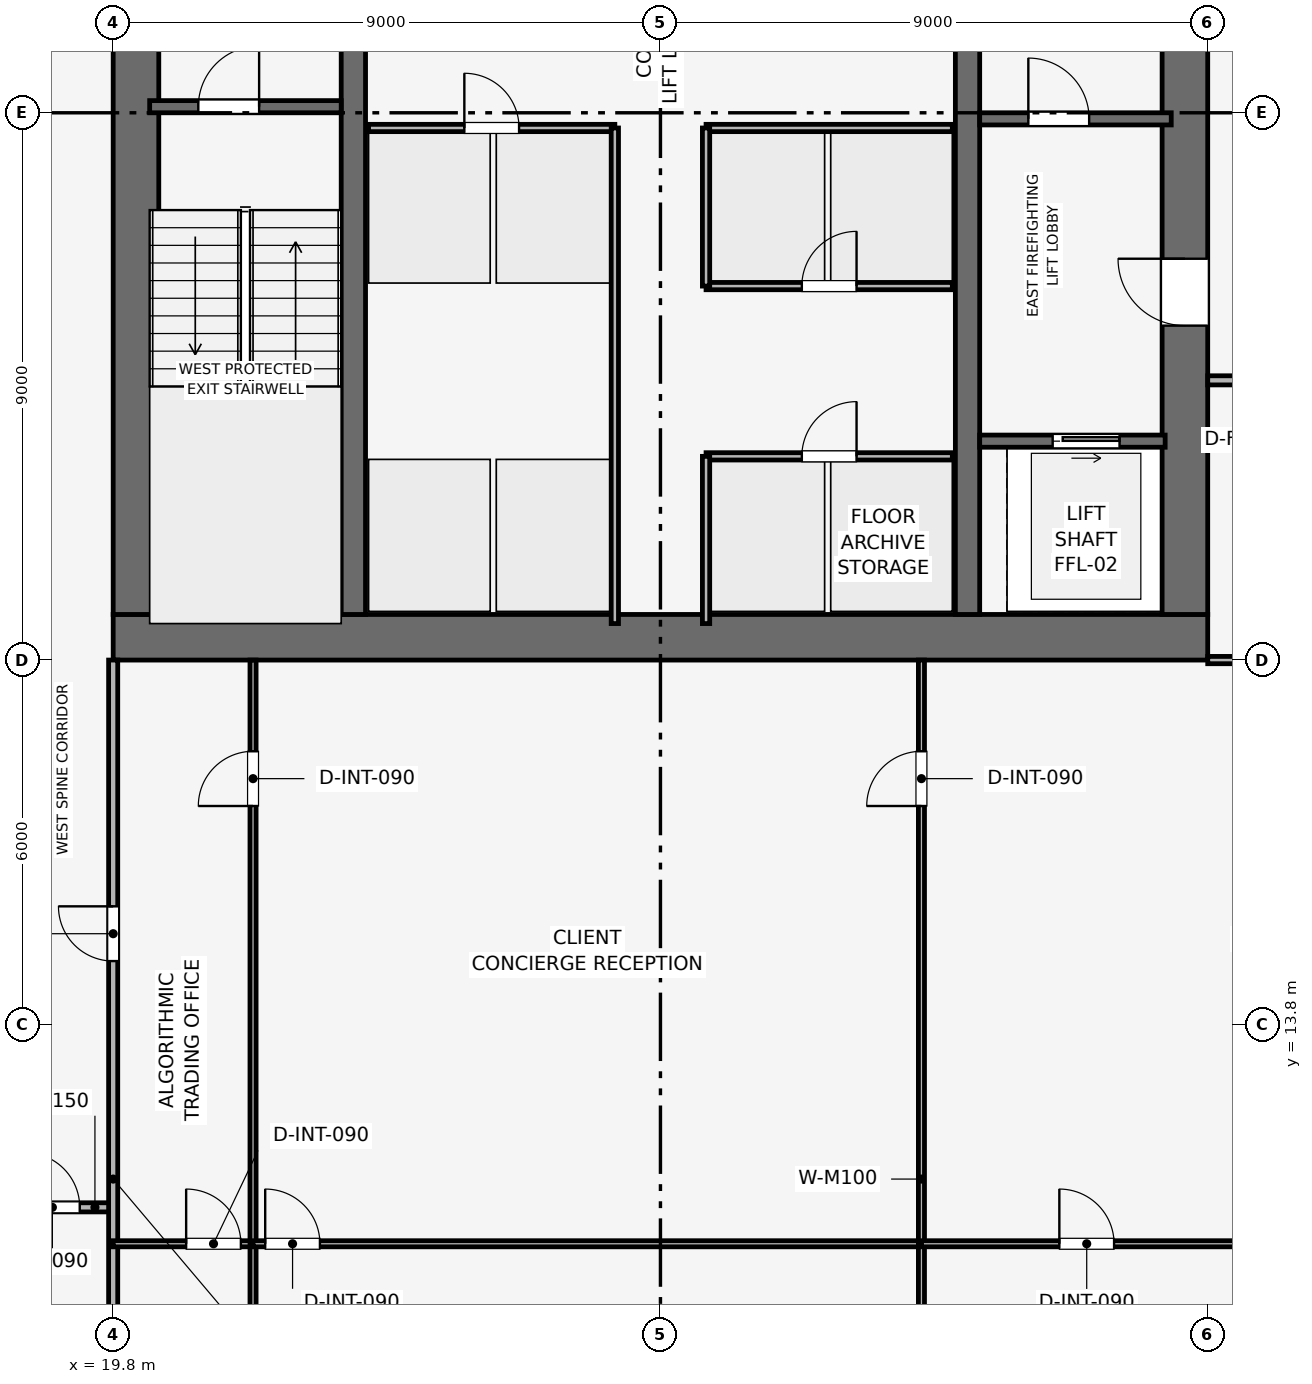
"""IFC4 building model, lengths in metres.
Left out: names, types, materials, properties, quantities, classifications, styles, units other than length and angle.
Written with IfcOpenShell. Run it as: python <this file> out.ifc"""

import sys

from ifc_helpers import new_model, si_unit, direction, frame, frame_2d, origin, place, context, subcontext, project, spatial, rectangle, extrude, element, fill, save


model = new_model("IFC4")
c1 = context("Model", 3, precision=1e-05, world=origin(), true_north=direction((0.0, 1.0)))
c2 = subcontext(c1, "Body", "Model", "MODEL_VIEW")
j1 = project(units=[si_unit("LENGTHUNIT", "METRE"), si_unit("PLANEANGLEUNIT", "RADIAN")], contexts=[c1])
p1 = place(None, origin())
s1 = spatial("IfcSite", under=j1, at=p1, CompositionType="ELEMENT")
p2 = place(p1, origin())
s2 = spatial("IfcBuilding", under=s1, at=p2, CompositionType="ELEMENT")
p3 = place(p2, frame((0.0, 0.0, 265.35)))
s3 = spatial("IfcBuildingStorey", under=s2, at=p3, CompositionType="ELEMENT", Elevation=265.35)
p4 = place(p3, frame((19.8, 20.175, 0.0), z_axis=(0.0, 0.0, 1.0), x_axis=(1.0, 0.0, 0.0)))
e1 = element("IfcWall", 1, at=p4, inside=s3, PredefinedType="SHEAR", context=c2, shape_type="SweptSolid", body=[
    extrude(rectangle(XDim=18.0, YDim=0.75, at=frame_2d((9.0, 0.0))), origin(), (0.0, 0.0, 1.0), 3.75),
])
p5 = place(p3, frame((20.175, 20.55, 0.0), z_axis=(0.0, 0.0, 1.0), x_axis=(0.0, 1.0, 0.0)))
e2 = element("IfcWall", 2, at=p5, inside=s3, PredefinedType="SHEAR", context=c2, shape_type="SweptSolid", body=[
    extrude(rectangle(XDim=16.5, YDim=0.75, at=frame_2d((8.25, 0.0))), origin(), (0.0, 0.0, 1.0), 3.75),
])
p6 = place(p5, frame((10.25, 0.0, 0.0)))
e3 = element("IfcOpeningElement", 3, at=p6, cuts=e2, PredefinedType="OPENING", context=c2, shape_type="SweptSolid", body=[
    extrude(rectangle(XDim=1.1, YDim=2.15, at=frame_2d((0.55, 1.075))), frame((0.0, 0.385, 0.0), z_axis=(0.0, -1.0, 0.0), x_axis=(1.0, 0.0, 0.0)), (0.0, 0.0, 1.0), 0.77),
])
p7 = place(p3, frame((37.425, 20.55, 0.0), z_axis=(0.0, 0.0, 1.0), x_axis=(0.0, 1.0, 0.0)))
e4 = element("IfcWall", 4, at=p7, inside=s3, PredefinedType="SHEAR", context=c2, shape_type="SweptSolid", body=[
    extrude(rectangle(XDim=16.5, YDim=0.75, at=frame_2d((8.25, 0.0))), origin(), (0.0, 0.0, 1.0), 3.75),
])
p8 = place(p7, frame((4.75, 0.0, 0.0)))
e5 = element("IfcOpeningElement", 5, at=p8, cuts=e4, PredefinedType="OPENING", context=c2, shape_type="SweptSolid", body=[
    extrude(rectangle(XDim=1.1, YDim=2.15, at=frame_2d((0.55, 1.075))), frame((0.0, 0.385, 0.0), z_axis=(0.0, -1.0, 0.0), x_axis=(1.0, 0.0, 0.0)), (0.0, 0.0, 1.0), 0.77),
])
for number, where, z_axis, x_axis in (
    (6, (23.75, 20.55, 0.0), (0.0, 0.0, 1.0), (0.0, 1.0, 0.0)),
    (7, (33.85, 20.55, 0.0), (0.0, 0.0, 1.0), (0.0, 1.0, 0.0)),
):
    element("IfcWall", number, at=place(p3, frame(where, z_axis=z_axis, x_axis=x_axis)), inside=s3, PredefinedType="SHEAR", context=c2, shape_type="SweptSolid", body=[
        extrude(rectangle(XDim=16.5, YDim=0.4, at=frame_2d((8.25, 0.0))), origin(), (0.0, 0.0, 1.0), 3.75),
    ])
p9 = place(p3, frame((20.4, 28.9, 0.0), z_axis=(0.0, 0.0, 1.0), x_axis=(1.0, 0.0, 0.0)))
e8 = element("IfcWall", 8, at=p9, inside=s3, PredefinedType="SHEAR", context=c2, shape_type="SweptSolid", body=[
    extrude(rectangle(XDim=3.15, YDim=0.2, at=frame_2d((1.575, 0.0))), origin(), (0.0, 0.0, 1.0), 3.5),
])
p10 = place(p9, frame((0.8, 0.0, 0.0)))
e9 = element("IfcOpeningElement", 9, at=p10, cuts=e8, PredefinedType="OPENING", context=c2, shape_type="SweptSolid", body=[
    extrude(rectangle(XDim=1.0, YDim=2.1, at=frame_2d((0.5, 1.05))), frame((0.0, 0.11, 0.0), z_axis=(0.0, -1.0, 0.0), x_axis=(1.0, 0.0, 0.0)), (0.0, 0.0, 1.0), 0.22),
])
p11 = place(p3, frame((34.05, 28.7, 0.0), z_axis=(0.0, 0.0, 1.0), x_axis=(1.0, 0.0, 0.0)))
e10 = element("IfcWall", 10, at=p11, inside=s3, PredefinedType="SHEAR", context=c2, shape_type="SweptSolid", body=[
    extrude(rectangle(XDim=3.15, YDim=0.2, at=frame_2d((1.575, 0.0))), origin(), (0.0, 0.0, 1.0), 3.5),
])
p12 = place(p11, frame((0.8, 0.0, 0.0)))
e11 = element("IfcOpeningElement", 11, at=p12, cuts=e10, PredefinedType="OPENING", context=c2, shape_type="SweptSolid", body=[
    extrude(rectangle(XDim=1.0, YDim=2.1, at=frame_2d((0.5, 1.05))), frame((0.0, 0.11, 0.0), z_axis=(0.0, -1.0, 0.0), x_axis=(1.0, 0.0, 0.0)), (0.0, 0.0, 1.0), 0.22),
])
p13 = place(p3, frame((34.05, 23.4, 0.0), z_axis=(0.0, 0.0, 1.0), x_axis=(1.0, 0.0, 0.0)))
e12 = element("IfcWall", 12, at=p13, inside=s3, PredefinedType="SHEAR", context=c2, shape_type="SweptSolid", body=[
    extrude(rectangle(XDim=3.05, YDim=0.2, at=frame_2d((1.525, 0.0))), origin(), (0.0, 0.0, 1.0), 3.5),
])
p14 = place(p13, frame((1.2, 0.0, 0.0)))
e13 = element("IfcOpeningElement", 13, at=p14, cuts=e12, PredefinedType="OPENING", context=c2, shape_type="SweptSolid", body=[
    extrude(rectangle(XDim=1.1, YDim=2.15, at=frame_2d((0.55, 1.075))), frame((0.0, 0.11, 0.0), z_axis=(0.0, -1.0, 0.0), x_axis=(1.0, 0.0, 0.0)), (0.0, 0.0, 1.0), 0.22),
])
p15 = place(p3, frame((24.0, 28.55, 0.0), z_axis=(0.0, 0.0, 1.0), x_axis=(1.0, 0.0, 0.0)))
e14 = element("IfcWall", 14, at=p15, inside=s3, PredefinedType="PARTITIONING", context=c2, shape_type="SweptSolid", body=[
    extrude(rectangle(XDim=4.05, YDim=0.12, at=frame_2d((2.025, 0.0))), origin(), (0.0, 0.0, 1.0), 3.5),
])
p16 = place(p15, frame((1.575, 0.0, 0.0)))
e15 = element("IfcOpeningElement", 15, at=p16, cuts=e14, PredefinedType="OPENING", context=c2, shape_type="SweptSolid", body=[
    extrude(rectangle(XDim=0.9, YDim=2.1, at=frame_2d((0.45, 1.05))), frame((0.0, 0.07, 0.0), z_axis=(0.0, -1.0, 0.0), x_axis=(1.0, 0.0, 0.0)), (0.0, 0.0, 1.0), 0.14),
])
p17 = place(p3, frame((28.05, 20.4, 0.0), z_axis=(0.0, 0.0, 1.0), x_axis=(0.0, 1.0, 0.0)))
e16 = element("IfcWall", 16, at=p17, inside=s3, PredefinedType="PARTITIONING", context=c2, shape_type="SweptSolid", body=[
    extrude(rectangle(XDim=8.15, YDim=0.12, at=frame_2d((4.075, 0.0))), origin(), (0.0, 0.0, 1.0), 3.5),
])
p18 = place(p3, frame((29.55, 23.15, 0.0), z_axis=(0.0, 0.0, 1.0), x_axis=(1.0, 0.0, 0.0)))
e17 = element("IfcWall", 17, at=p18, inside=s3, PredefinedType="PARTITIONING", context=c2, shape_type="SweptSolid", body=[
    extrude(rectangle(XDim=4.05, YDim=0.12, at=frame_2d((2.025, 0.0))), origin(), (0.0, 0.0, 1.0), 3.5),
])
p19 = place(p18, frame((1.575, 0.0, 0.0)))
e18 = element("IfcOpeningElement", 18, at=p19, cuts=e17, PredefinedType="OPENING", context=c2, shape_type="SweptSolid", body=[
    extrude(rectangle(XDim=0.9, YDim=2.1, at=frame_2d((0.45, 1.05))), frame((0.0, 0.07, 0.0), z_axis=(0.0, -1.0, 0.0), x_axis=(1.0, 0.0, 0.0)), (0.0, 0.0, 1.0), 0.14),
])
p20 = place(p3, frame((29.55, 20.4, 0.0), z_axis=(0.0, 0.0, 1.0), x_axis=(0.0, 1.0, 0.0)))
e19 = element("IfcWall", 19, at=p20, inside=s3, PredefinedType="PARTITIONING", context=c2, shape_type="SweptSolid", body=[
    extrude(rectangle(XDim=2.75, YDim=0.12, at=frame_2d((1.375, 0.0))), origin(), (0.0, 0.0, 1.0), 3.5),
])
p21 = place(p3, frame((29.55, 25.95, 0.0), z_axis=(0.0, 0.0, 1.0), x_axis=(1.0, 0.0, 0.0)))
e20 = element("IfcWall", 20, at=p21, inside=s3, PredefinedType="PARTITIONING", context=c2, shape_type="SweptSolid", body=[
    extrude(rectangle(XDim=4.05, YDim=0.12, at=frame_2d((2.025, 0.0))), origin(), (0.0, 0.0, 1.0), 3.5),
])
p22 = place(p21, frame((1.575, 0.0, 0.0)))
e21 = element("IfcOpeningElement", 21, at=p22, cuts=e20, PredefinedType="OPENING", context=c2, shape_type="SweptSolid", body=[
    extrude(rectangle(XDim=0.9, YDim=2.1, at=frame_2d((0.45, 1.05))), frame((0.0, 0.07, 0.0), z_axis=(0.0, -1.0, 0.0), x_axis=(1.0, 0.0, 0.0)), (0.0, 0.0, 1.0), 0.14),
])
p23 = place(p3, frame((29.55, 28.55, 0.0), z_axis=(0.0, 0.0, 1.0), x_axis=(1.0, 0.0, 0.0)))
e22 = element("IfcWall", 22, at=p23, inside=s3, PredefinedType="PARTITIONING", context=c2, shape_type="SweptSolid", body=[
    extrude(rectangle(XDim=4.05, YDim=0.12, at=frame_2d((2.025, 0.0))), origin(), (0.0, 0.0, 1.0), 3.5),
])
p24 = place(p3, frame((29.55, 25.95, 0.0), z_axis=(0.0, 0.0, 1.0), x_axis=(0.0, 1.0, 0.0)))
e23 = element("IfcWall", 23, at=p24, inside=s3, PredefinedType="PARTITIONING", context=c2, shape_type="SweptSolid", body=[
    extrude(rectangle(XDim=2.6, YDim=0.12, at=frame_2d((1.3, 0.0))), origin(), (0.0, 0.0, 1.0), 3.5),
])
p25 = place(p3, frame((17.9, 10.8, 0.0), z_axis=(0.0, 0.0, 1.0), x_axis=(1.0, 0.0, 0.0)))
e24 = element("IfcWall", 24, at=p25, inside=s3, PredefinedType="PARTITIONING", context=c2, shape_type="SweptSolid", body=[
    extrude(rectangle(XDim=1.9, YDim=0.15, at=frame_2d((0.95, 0.0))), origin(), (0.0, 0.0, 1.0), 3.5),
])
p26 = place(p25, frame((0.45, 0.0, 0.0)))
e25 = element("IfcOpeningElement", 25, at=p26, cuts=e24, PredefinedType="OPENING", context=c2, shape_type="SweptSolid", body=[
    extrude(rectangle(XDim=0.9, YDim=2.1, at=frame_2d((0.45, 1.05))), frame((0.0, 0.085, 0.0), z_axis=(0.0, -1.0, 0.0), x_axis=(1.0, 0.0, 0.0)), (0.0, 0.0, 1.0), 0.17),
])
p27 = place(p3, frame((19.8, 4.03, 0.0), z_axis=(0.0, 0.0, 1.0), x_axis=(0.0, 1.0, 0.0)))
e26 = element("IfcWall", 26, at=p27, inside=s3, PredefinedType="PARTITIONING", context=c2, shape_type="SweptSolid", body=[
    extrude(rectangle(XDim=15.77, YDim=0.15, at=frame_2d((7.885, 0.0))), origin(), (0.0, 0.0, 1.0), 3.085),
])
p28 = place(p27, frame((10.82, 0.0, 0.0)))
e27 = element("IfcOpeningElement", 27, at=p28, cuts=e26, PredefinedType="OPENING", context=c2, shape_type="SweptSolid", body=[
    extrude(rectangle(XDim=0.9, YDim=2.1, at=frame_2d((0.45, 1.05))), frame((0.0, 0.085, 0.0), z_axis=(0.0, -1.0, 0.0), x_axis=(1.0, 0.0, 0.0)), (0.0, 0.0, 1.0), 0.17),
])
p29 = place(p3, frame((19.8, 10.201, 0.0), z_axis=(0.0, 0.0, 1.0), x_axis=(1.0, 0.0, 0.0)))
e28 = element("IfcWall", 28, at=p29, inside=s3, PredefinedType="MOVABLE", context=c2, shape_type="SweptSolid", body=[
    extrude(rectangle(XDim=2.3, YDim=0.1, at=frame_2d((1.15, 0.0))), origin(), (0.0, 0.0, 1.0), 3.085),
])
p30 = place(p29, frame((1.2, 0.0, 0.0)))
e29 = element("IfcOpeningElement", 29, at=p30, cuts=e28, PredefinedType="OPENING", context=c2, shape_type="SweptSolid", body=[
    extrude(rectangle(XDim=0.9, YDim=2.1, at=frame_2d((0.45, 1.05))), frame((0.0, 0.06, 0.0), z_axis=(0.0, -1.0, 0.0), x_axis=(1.0, 0.0, 0.0)), (0.0, 0.0, 1.0), 0.12),
])
p31 = place(p3, frame((22.1, 4.03, 0.0), z_axis=(0.0, 0.0, 1.0), x_axis=(0.0, 1.0, 0.0)))
e30 = element("IfcWall", 30, at=p31, inside=s3, PredefinedType="MOVABLE", context=c2, shape_type="SweptSolid", body=[
    extrude(rectangle(XDim=15.77, YDim=0.1, at=frame_2d((7.885, 0.0))), origin(), (0.0, 0.0, 1.0), 3.085),
])
p32 = place(p31, frame((13.37, 0.0, 0.0)))
e31 = element("IfcOpeningElement", 31, at=p32, cuts=e30, PredefinedType="OPENING", context=c2, shape_type="SweptSolid", body=[
    extrude(rectangle(XDim=0.9, YDim=2.1, at=frame_2d((0.45, 1.05))), frame((0.0, 0.06, 0.0), z_axis=(0.0, -1.0, 0.0), x_axis=(1.0, 0.0, 0.0)), (0.0, 0.0, 1.0), 0.12),
])
p33 = place(p3, frame((22.1, 10.201, 0.0), z_axis=(0.0, 0.0, 1.0), x_axis=(1.0, 0.0, 0.0)))
e32 = element("IfcWall", 32, at=p33, inside=s3, PredefinedType="MOVABLE", context=c2, shape_type="SweptSolid", body=[
    extrude(rectangle(XDim=10.992, YDim=0.1, at=frame_2d((5.496, 0.0))), origin(), (0.0, 0.0, 1.0), 3.085),
])
p34 = place(p33, frame((0.2, 0.0, 0.0)))
e33 = element("IfcOpeningElement", 33, at=p34, cuts=e32, PredefinedType="OPENING", context=c2, shape_type="SweptSolid", body=[
    extrude(rectangle(XDim=0.9, YDim=2.1, at=frame_2d((0.45, 1.05))), frame((0.0, 0.06, 0.0), z_axis=(0.0, -1.0, 0.0), x_axis=(1.0, 0.0, 0.0)), (0.0, 0.0, 1.0), 0.12),
])
p35 = place(p3, frame((33.092, 4.03, 0.0), z_axis=(0.0, 0.0, 1.0), x_axis=(0.0, 1.0, 0.0)))
e34 = element("IfcWall", 34, at=p35, inside=s3, PredefinedType="MOVABLE", context=c2, shape_type="SweptSolid", body=[
    extrude(rectangle(XDim=15.77, YDim=0.1, at=frame_2d((7.885, 0.0))), origin(), (0.0, 0.0, 1.0), 3.085),
])
p36 = place(p35, frame((13.37, 0.0, 0.0)))
e35 = element("IfcOpeningElement", 35, at=p36, cuts=e34, PredefinedType="OPENING", context=c2, shape_type="SweptSolid", body=[
    extrude(rectangle(XDim=0.9, YDim=2.1, at=frame_2d((0.45, 1.05))), frame((0.0, 0.06, 0.0), z_axis=(0.0, -1.0, 0.0), x_axis=(1.0, 0.0, 0.0)), (0.0, 0.0, 1.0), 0.12),
])
p37 = place(p3, frame((33.092, 10.201, 0.0), z_axis=(0.0, 0.0, 1.0), x_axis=(1.0, 0.0, 0.0)))
e36 = element("IfcWall", 36, at=p37, inside=s3, PredefinedType="MOVABLE", context=c2, shape_type="SweptSolid", body=[
    extrude(rectangle(XDim=13.708, YDim=0.1, at=frame_2d((6.854, 0.0))), origin(), (0.0, 0.0, 1.0), 3.085),
])
p38 = place(p37, frame((2.268, 0.0, 0.0)))
e37 = element("IfcOpeningElement", 37, at=p38, cuts=e36, PredefinedType="OPENING", context=c2, shape_type="SweptSolid", body=[
    extrude(rectangle(XDim=0.9, YDim=2.1, at=frame_2d((0.45, 1.05))), frame((0.0, 0.06, 0.0), z_axis=(0.0, -1.0, 0.0), x_axis=(1.0, 0.0, 0.0)), (0.0, 0.0, 1.0), 0.12),
])
p39 = place(p3, frame((37.8, 19.8, 0.0), z_axis=(0.0, 0.0, 1.0), x_axis=(1.0, 0.0, 0.0)))
e38 = element("IfcWall", 38, at=p39, inside=s3, PredefinedType="PARTITIONING", context=c2, shape_type="SweptSolid", body=[
    extrude(rectangle(XDim=15.77, YDim=0.12, at=frame_2d((7.885, 0.0))), origin(), (0.0, 0.0, 1.0), 3.085),
])
p40 = place(p3, frame((37.8, 24.4, 0.0), z_axis=(0.0, 0.0, 1.0), x_axis=(1.0, 0.0, 0.0)))
e39 = element("IfcWall", 39, at=p40, inside=s3, PredefinedType="PARTITIONING", context=c2, shape_type="SweptSolid", body=[
    extrude(rectangle(XDim=1.9, YDim=0.15, at=frame_2d((0.95, 0.0))), origin(), (0.0, 0.0, 1.0), 3.5),
])
p41 = place(p40, frame((0.45, 0.0, 0.0)))
e40 = element("IfcOpeningElement", 40, at=p41, cuts=e39, PredefinedType="OPENING", context=c2, shape_type="SweptSolid", body=[
    extrude(rectangle(XDim=0.9, YDim=2.1, at=frame_2d((0.45, 1.05))), frame((0.0, 0.085, 0.0), z_axis=(0.0, -1.0, 0.0), x_axis=(1.0, 0.0, 0.0)), (0.0, 0.0, 1.0), 0.17),
])
p42 = place(p10, origin())
e41 = element("IfcDoor", 41, at=p42, inside=s3, OperationType="SINGLE_SWING_RIGHT", PredefinedType="DOOR", context=c2, shape_type="SweptSolid", body=[
    extrude(rectangle(XDim=1.0, YDim=2.1, at=frame_2d((0.5, 1.05))), frame((0.0, 0.025, 0.0), z_axis=(0.0, -1.0, 0.0), x_axis=(1.0, 0.0, 0.0)), (0.0, 0.0, 1.0), 0.05),
])
fill(e9, e41)
p43 = place(p12, origin())
e42 = element("IfcDoor", 42, at=p43, inside=s3, OperationType="SINGLE_SWING_LEFT", PredefinedType="DOOR", context=c2, shape_type="SweptSolid", body=[
    extrude(rectangle(XDim=1.0, YDim=2.1, at=frame_2d((0.5, 1.05))), frame((0.0, 0.025, 0.0), z_axis=(0.0, -1.0, 0.0), x_axis=(1.0, 0.0, 0.0)), (0.0, 0.0, 1.0), 0.05),
])
fill(e11, e42)
p44 = place(p14, origin())
e43 = element("IfcDoor", 43, at=p44, inside=s3, OperationType="SLIDING_TO_RIGHT", PredefinedType="DOOR", context=c2, shape_type="SweptSolid", body=[
    extrude(rectangle(XDim=1.1, YDim=2.15, at=frame_2d((0.55, 1.075))), frame((0.0, 0.025, 0.0), z_axis=(0.0, -1.0, 0.0), x_axis=(1.0, 0.0, 0.0)), (0.0, 0.0, 1.0), 0.05),
])
fill(e13, e43)
p45 = place(p16, origin())
e44 = element("IfcDoor", 44, at=p45, inside=s3, OperationType="SINGLE_SWING_LEFT", PredefinedType="DOOR", context=c2, shape_type="SweptSolid", body=[
    extrude(rectangle(XDim=0.9, YDim=2.1, at=frame_2d((0.45, 1.05))), frame((0.0, 0.025, 0.0), z_axis=(0.0, -1.0, 0.0), x_axis=(1.0, 0.0, 0.0)), (0.0, 0.0, 1.0), 0.05),
])
fill(e15, e44)
p46 = place(p19, origin())
e45 = element("IfcDoor", 45, at=p46, inside=s3, OperationType="SINGLE_SWING_RIGHT", PredefinedType="DOOR", context=c2, shape_type="SweptSolid", body=[
    extrude(rectangle(XDim=0.9, YDim=2.1, at=frame_2d((0.45, 1.05))), frame((0.0, 0.025, 0.0), z_axis=(0.0, -1.0, 0.0), x_axis=(1.0, 0.0, 0.0)), (0.0, 0.0, 1.0), 0.05),
])
fill(e18, e45)
p47 = place(p22, origin())
e46 = element("IfcDoor", 46, at=p47, inside=s3, OperationType="SINGLE_SWING_RIGHT", PredefinedType="DOOR", context=c2, shape_type="SweptSolid", body=[
    extrude(rectangle(XDim=0.9, YDim=2.1, at=frame_2d((0.45, 1.05))), frame((0.0, 0.025, 0.0), z_axis=(0.0, -1.0, 0.0), x_axis=(1.0, 0.0, 0.0)), (0.0, 0.0, 1.0), 0.05),
])
fill(e21, e46)
p48 = place(p26, origin())
e47 = element("IfcDoor", 47, at=p48, inside=s3, OperationType="SINGLE_SWING_LEFT", PredefinedType="DOOR", context=c2, shape_type="SweptSolid", body=[
    extrude(rectangle(XDim=0.9, YDim=2.1, at=frame_2d((0.45, 1.05))), frame((0.0, 0.025, 0.0), z_axis=(0.0, -1.0, 0.0), x_axis=(1.0, 0.0, 0.0)), (0.0, 0.0, 1.0), 0.05),
])
fill(e25, e47)
p49 = place(p28, origin())
e48 = element("IfcDoor", 48, at=p49, inside=s3, OperationType="SINGLE_SWING_RIGHT", PredefinedType="DOOR", context=c2, shape_type="SweptSolid", body=[
    extrude(rectangle(XDim=0.9, YDim=2.1, at=frame_2d((0.45, 1.05))), frame((0.0, 0.025, 0.0), z_axis=(0.0, -1.0, 0.0), x_axis=(1.0, 0.0, 0.0)), (0.0, 0.0, 1.0), 0.05),
])
fill(e27, e48)
p50 = place(p30, origin())
e49 = element("IfcDoor", 49, at=p50, inside=s3, OperationType="SINGLE_SWING_LEFT", PredefinedType="DOOR", context=c2, shape_type="SweptSolid", body=[
    extrude(rectangle(XDim=0.9, YDim=2.1, at=frame_2d((0.45, 1.05))), frame((0.0, 0.025, 0.0), z_axis=(0.0, -1.0, 0.0), x_axis=(1.0, 0.0, 0.0)), (0.0, 0.0, 1.0), 0.05),
])
fill(e29, e49)
p51 = place(p32, origin())
e50 = element("IfcDoor", 50, at=p51, inside=s3, OperationType="SINGLE_SWING_LEFT", PredefinedType="DOOR", context=c2, shape_type="SweptSolid", body=[
    extrude(rectangle(XDim=0.9, YDim=2.1, at=frame_2d((0.45, 1.05))), frame((0.0, 0.025, 0.0), z_axis=(0.0, -1.0, 0.0), x_axis=(1.0, 0.0, 0.0)), (0.0, 0.0, 1.0), 0.05),
])
fill(e31, e50)
p52 = place(p34, origin())
e51 = element("IfcDoor", 51, at=p52, inside=s3, OperationType="SINGLE_SWING_LEFT", PredefinedType="DOOR", context=c2, shape_type="SweptSolid", body=[
    extrude(rectangle(XDim=0.9, YDim=2.1, at=frame_2d((0.45, 1.05))), frame((0.0, 0.025, 0.0), z_axis=(0.0, -1.0, 0.0), x_axis=(1.0, 0.0, 0.0)), (0.0, 0.0, 1.0), 0.05),
])
fill(e33, e51)
p53 = place(p36, origin())
e52 = element("IfcDoor", 52, at=p53, inside=s3, OperationType="SINGLE_SWING_LEFT", PredefinedType="DOOR", context=c2, shape_type="SweptSolid", body=[
    extrude(rectangle(XDim=0.9, YDim=2.1, at=frame_2d((0.45, 1.05))), frame((0.0, 0.025, 0.0), z_axis=(0.0, -1.0, 0.0), x_axis=(1.0, 0.0, 0.0)), (0.0, 0.0, 1.0), 0.05),
])
fill(e35, e52)
p54 = place(p38, origin())
e53 = element("IfcDoor", 53, at=p54, inside=s3, OperationType="SINGLE_SWING_LEFT", PredefinedType="DOOR", context=c2, shape_type="SweptSolid", body=[
    extrude(rectangle(XDim=0.9, YDim=2.1, at=frame_2d((0.45, 1.05))), frame((0.0, 0.025, 0.0), z_axis=(0.0, -1.0, 0.0), x_axis=(1.0, 0.0, 0.0)), (0.0, 0.0, 1.0), 0.05),
])
fill(e37, e53)
p55 = place(p8, origin())
e54 = element("IfcDoor", 54, at=p55, inside=s3, OperationType="SINGLE_SWING_RIGHT", PredefinedType="DOOR", context=c2, shape_type="SweptSolid", body=[
    extrude(rectangle(XDim=1.1, YDim=2.15, at=frame_2d((0.55, 1.075))), frame((0.0, 0.025, 0.0), z_axis=(0.0, -1.0, 0.0), x_axis=(1.0, 0.0, 0.0)), (0.0, 0.0, 1.0), 0.05),
])
fill(e5, e54)
save(model, sys.argv[1])
